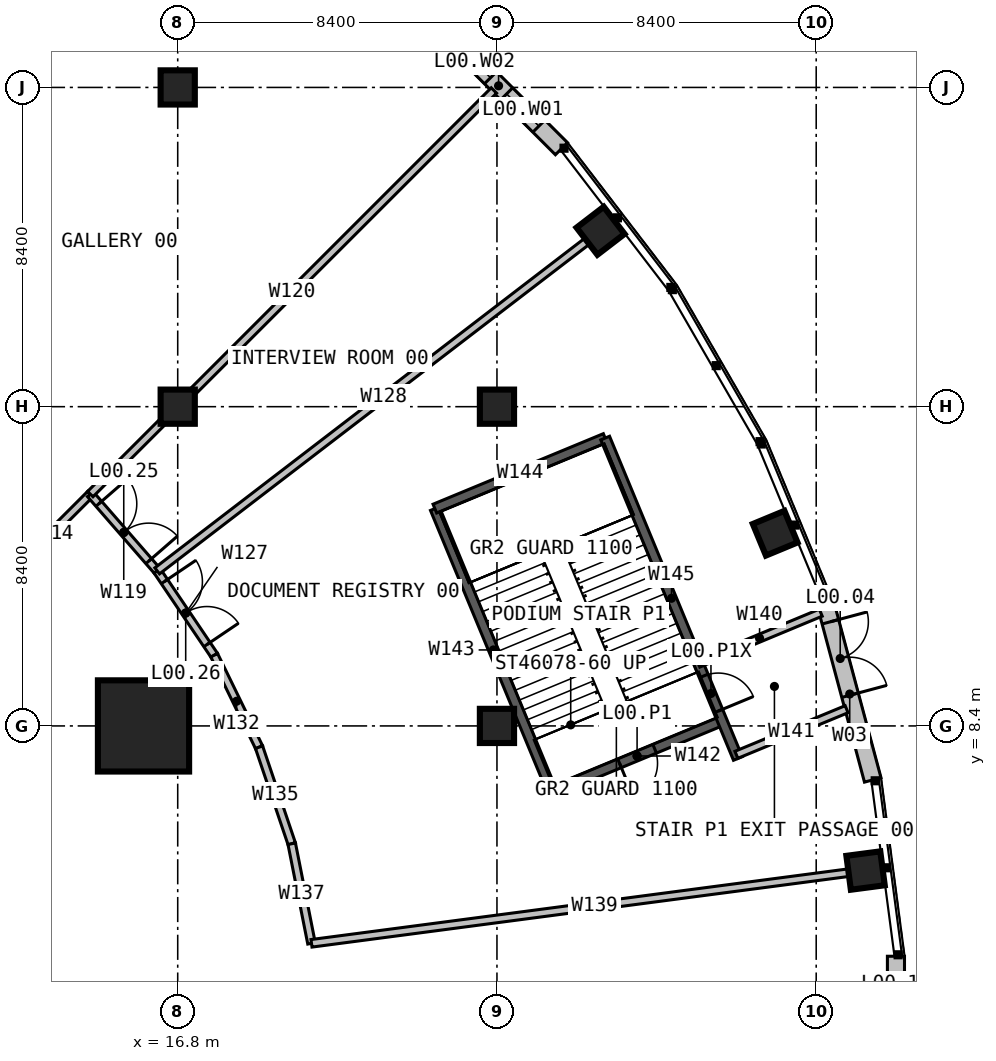
"""IFC4 building model, lengths in metres.
Left out: names, types, materials, properties, quantities, classifications, styles, units other than length and angle.
Written with IfcOpenShell. Run it as: python <this file> out.ifc"""

import sys

from ifc_helpers import new_model, si_unit, direction, frame, frame_2d, origin, origin_2d, place, context, subcontext, project, spatial, rectangle, extrude, element, fill, save


model = new_model("IFC4")
c1 = context("Model", 3, precision=1e-05, world=origin(), true_north=direction((0.0, 1.0)))
c2 = subcontext(c1, "Body", "Model", "MODEL_VIEW")
j1 = project(units=[si_unit("LENGTHUNIT", "METRE"), si_unit("PLANEANGLEUNIT", "RADIAN")], contexts=[c1])
p1 = place(None, origin())
s1 = spatial("IfcSite", under=j1, at=p1, CompositionType="ELEMENT")
p2 = place(p1, origin())
s2 = spatial("IfcBuilding", under=s1, at=p2, CompositionType="ELEMENT")
p3 = place(p2, origin())
s3 = spatial("IfcBuildingStorey", under=s2, at=p3, CompositionType="ELEMENT", Elevation=0.0)
p4 = place(p3, frame((15.9, 8.4, 0.0), z_axis=(0.0, 0.0, 1.0), x_axis=(1.0, 0.0, 0.0)))
e1 = element("IfcColumn", 1, at=p4, inside=s3, PredefinedType="COLUMN", context=c2, shape_type="SweptSolid", body=[
    extrude(rectangle(XDim=2.4, YDim=2.4, at=origin_2d()), origin(), (0.0, 0.0, 1.0), 6.0),
])
for number, where, z_axis, x_axis in (
    (2, (16.8, 16.8, 0.0), (0.0, 0.0, 1.0), (1.0, 0.0, 0.0)),
    (3, (16.8, 25.2, 0.0), (0.0, 0.0, 1.0), (1.0, 0.0, 0.0)),
    (4, (25.2, 8.4, 0.0), (0.0, 0.0, 1.0), (1.0, 0.0, 0.0)),
    (5, (25.2, 16.8, 0.0), (0.0, 0.0, 1.0), (1.0, 0.0, 0.0)),
    (6, (34.899, 4.594, 0.0), (0.0, 0.0, 1.0), (0.991, 0.131, 0.0)),
    (7, (32.521, 13.47, 0.0), (0.0, 0.0, 1.0), (0.924, 0.383, 0.0)),
    (8, (27.926, 21.428, 0.0), (0.0, 0.0, 1.0), (0.793, 0.609, 0.0)),
):
    element("IfcColumn", number, at=place(p3, frame(where, z_axis=z_axis, x_axis=x_axis)), inside=s3, PredefinedType="COLUMN", context=c2, shape_type="SweptSolid", body=[
        extrude(rectangle(XDim=0.9, YDim=0.9, at=origin_2d()), origin(), (0.0, 0.0, 1.0), 6.0),
    ])
p5 = place(p3, frame((35.088, 6.979, 0.0), z_axis=(0.0, 0.0, 1.0), x_axis=(-0.258815185258, 0.965926860523, 0.0)))
e9 = element("IfcWall", 9, at=p5, inside=s3, PredefinedType="SOLIDWALL", context=c2, shape_type="SweptSolid", body=[
    extrude(rectangle(XDim=4.68, YDim=0.45, at=frame_2d((2.34, 0.0))), origin(), (0.0, 0.0, 1.0), 5.7),
])
p6 = place(p5, frame((2.308, 0.0, 0.0)))
e10 = element("IfcOpeningElement", 10, at=p6, cuts=e9, PredefinedType="OPENING", context=c2, shape_type="SweptSolid", body=[
    extrude(rectangle(XDim=2.0, YDim=3.0, at=frame_2d((1.0, 1.5))), frame((0.0, 0.235, 0.0), z_axis=(0.0, -1.0, 0.0), x_axis=(1.0, 0.0, 0.0)), (0.0, 0.0, 1.0), 0.47),
])
p7 = place(p3, frame((26.897, 23.588, 0.0), z_axis=(0.0, 0.0, 1.0), x_axis=(-0.707106781187, 0.707106781187, 0.0)))
e11 = element("IfcWall", 11, at=p7, inside=s3, PredefinedType="SOLIDWALL", context=c2, shape_type="SweptSolid", body=[
    extrude(rectangle(XDim=4.679, YDim=0.45, at=frame_2d((2.34, 0.0))), origin(), (0.0, 0.0, 1.0), 5.7),
])
p8 = place(p7, frame((0.84, 0.0, 0.9)))
e12 = element("IfcOpeningElement", 12, at=p8, cuts=e11, PredefinedType="OPENING", context=c2, shape_type="SweptSolid", body=[
    extrude(rectangle(XDim=1.2, YDim=3.6, at=frame_2d((0.6, 1.8))), frame((0.0, 0.235, 0.0), z_axis=(0.0, -1.0, 0.0), x_axis=(1.0, 0.0, 0.0)), (0.0, 0.0, 1.0), 0.47),
])
p9 = place(p7, frame((2.64, 0.0, 0.9)))
e13 = element("IfcOpeningElement", 13, at=p9, cuts=e11, PredefinedType="OPENING", context=c2, shape_type="SweptSolid", body=[
    extrude(rectangle(XDim=1.2, YDim=3.6, at=frame_2d((0.6, 1.8))), frame((0.0, 0.235, 0.0), z_axis=(0.0, -1.0, 0.0), x_axis=(1.0, 0.0, 0.0)), (0.0, 0.0, 1.0), 0.47),
])
p10 = place(p3, frame((35.698, -2.34, 0.0), z_axis=(0.0, 0.0, 1.0), x_axis=(0.0, 1.0, 0.0)))
e14 = element("IfcWall", 14, at=p10, inside=s3, PredefinedType="SOLIDWALL", context=c2, shape_type="SweptSolid", body=[
    extrude(rectangle(XDim=4.68, YDim=0.45, at=frame_2d((2.34, 0.0))), origin(), (0.0, 0.0, 1.0), 5.7),
])
p11 = place(p10, frame((1.34, 0.0, 0.0)))
e15 = element("IfcOpeningElement", 15, at=p11, cuts=e14, PredefinedType="OPENING", context=c2, shape_type="SweptSolid", body=[
    extrude(rectangle(XDim=2.0, YDim=3.0, at=frame_2d((1.0, 1.5))), frame((0.0, 0.235, 0.0), z_axis=(0.0, -1.0, 0.0), x_axis=(1.0, 0.0, 0.0)), (0.0, 0.0, 1.0), 0.47),
])
p12 = place(p3, frame((31.127, 8.537, 0.0), z_axis=(0.0, 0.0, 1.0), x_axis=(-0.923880627248, -0.382680789426, 0.0)))
e16 = element("IfcWall", 16, at=p12, inside=s3, PredefinedType="SOLIDWALL", context=c2, shape_type="SweptSolid", body=[
    extrude(rectangle(XDim=4.85, YDim=0.25, at=frame_2d((2.425, 0.0))), origin(), (0.0, 0.0, 1.0), 6.0),
])
p13 = place(p12, frame((1.925, 0.0, 0.0)))
e17 = element("IfcOpeningElement", 17, at=p13, cuts=e16, PredefinedType="OPENING", context=c2, shape_type="SweptSolid", body=[
    extrude(rectangle(XDim=1.0, YDim=2.2, at=frame_2d((0.5, 1.1))), frame((0.0, 0.135, 0.0), z_axis=(0.0, -1.0, 0.0), x_axis=(1.0, 0.0, 0.0)), (0.0, 0.0, 1.0), 0.27),
])
p14 = place(p3, frame((26.647, 6.681, 0.0), z_axis=(0.0, 0.0, 1.0), x_axis=(-0.382689294869, 0.923877104161, 0.0)))
e18 = element("IfcWall", 18, at=p14, inside=s3, PredefinedType="SOLIDWALL", context=c2, shape_type="SweptSolid", body=[
    extrude(rectangle(XDim=8.05, YDim=0.25, at=frame_2d((4.025, 0.0))), origin(), (0.0, 0.0, 1.0), 6.0),
])
p15 = place(p3, frame((23.566, 14.118, 0.0), z_axis=(0.0, 0.0, 1.0), x_axis=(0.923862828997, 0.382723755727, 0.0)))
e19 = element("IfcWall", 19, at=p15, inside=s3, PredefinedType="SOLIDWALL", context=c2, shape_type="SweptSolid", body=[
    extrude(rectangle(XDim=4.85, YDim=0.25, at=frame_2d((2.425, 0.0))), origin(), (0.0, 0.0, 1.0), 6.0),
])
p16 = place(p3, frame((28.047, 15.974, 0.0), z_axis=(0.0, 0.0, 1.0), x_axis=(0.38267867035, -0.923881504988, 0.0)))
e20 = element("IfcWall", 20, at=p16, inside=s3, PredefinedType="SOLIDWALL", context=c2, shape_type="SweptSolid", body=[
    extrude(rectangle(XDim=9.125, YDim=0.25, at=frame_2d((4.562, 0.0))), origin(), (0.0, 0.0, 1.0), 6.0),
])
p17 = place(p16, frame((6.775, 0.0, 0.0)))
e21 = element("IfcOpeningElement", 21, at=p17, cuts=e20, PredefinedType="OPENING", context=c2, shape_type="SweptSolid", body=[
    extrude(rectangle(XDim=1.0, YDim=2.2, at=frame_2d((0.5, 1.1))), frame((0.0, 0.135, 0.0), z_axis=(0.0, -1.0, 0.0), x_axis=(1.0, 0.0, 0.0)), (0.0, 0.0, 1.0), 0.27),
])
p18 = place(p3, frame((12.38, 12.38, 0.0), z_axis=(0.0, 0.0, 1.0), x_axis=(0.707106781187, 0.707106781187, 0.0)))
e22 = element("IfcWall", 22, at=p18, inside=s3, PredefinedType="PARTITIONING", context=c2, shape_type="SweptSolid", body=[
    extrude(rectangle(XDim=2.998, YDim=0.2, at=frame_2d((1.499, 0.0))), origin(), (0.0, 0.0, 1.0), 5.7),
])
p19 = place(p3, frame((14.5, 14.5, 0.0), z_axis=(0.0, 0.0, 1.0), x_axis=(0.656916126811, -0.753963661151, 0.0)))
e23 = element("IfcWall", 23, at=p19, inside=s3, PredefinedType="PARTITIONING", context=c2, shape_type="SweptSolid", body=[
    extrude(rectangle(XDim=2.679, YDim=0.2, at=frame_2d((1.34, 0.0))), origin(), (0.0, 0.0, 1.0), 5.7),
])
p20 = place(p19, frame((0.34, 0.0, 0.0)))
e24 = element("IfcOpeningElement", 24, at=p20, cuts=e23, PredefinedType="OPENING", context=c2, shape_type="SweptSolid", body=[
    extrude(rectangle(XDim=2.0, YDim=2.4, at=frame_2d((1.0, 1.2))), frame((0.0, 0.11, 0.0), z_axis=(0.0, -1.0, 0.0), x_axis=(1.0, 0.0, 0.0)), (0.0, 0.0, 1.0), 0.22),
])
p21 = place(p3, frame((14.5, 14.5, 0.0), z_axis=(0.0, 0.0, 1.0), x_axis=(0.707106781187, 0.707106781187, 0.0)))
e25 = element("IfcWall", 25, at=p21, inside=s3, PredefinedType="PARTITIONING", context=c2, shape_type="SweptSolid", body=[
    extrude(rectangle(XDim=15.019, YDim=0.2, at=frame_2d((7.51, 0.0))), origin(), (0.0, 0.0, 1.0), 5.7),
])
p22 = place(p3, frame((16.26, 12.48, 0.0), z_axis=(0.0, 0.0, 1.0), x_axis=(0.559862483837, -0.828585541264, 0.0)))
e26 = element("IfcWall", 26, at=p22, inside=s3, PredefinedType="PARTITIONING", context=c2, shape_type="SweptSolid", body=[
    extrude(rectangle(XDim=2.679, YDim=0.2, at=frame_2d((1.34, 0.0))), origin(), (0.0, 0.0, 1.0), 5.7),
])
p23 = place(p22, frame((0.34, 0.0, 0.0)))
e27 = element("IfcOpeningElement", 27, at=p23, cuts=e26, PredefinedType="OPENING", context=c2, shape_type="SweptSolid", body=[
    extrude(rectangle(XDim=2.0, YDim=2.4, at=frame_2d((1.0, 1.2))), frame((0.0, 0.11, 0.0), z_axis=(0.0, -1.0, 0.0), x_axis=(1.0, 0.0, 0.0)), (0.0, 0.0, 1.0), 0.22),
])
p24 = place(p3, frame((16.26, 12.48, 0.0), z_axis=(0.0, 0.0, 1.0), x_axis=(0.79355717759, 0.608495690943, 0.0)))
e28 = element("IfcWall", 28, at=p24, inside=s3, PredefinedType="PARTITIONING", context=c2, shape_type="SweptSolid", body=[
    extrude(rectangle(XDim=15.021, YDim=0.2, at=frame_2d((7.51, 0.0))), origin(), (0.0, 0.0, 1.0), 5.7),
])
p25 = place(p3, frame((17.76, 10.26, 0.0), z_axis=(0.0, 0.0, 1.0), x_axis=(0.438268188545, -0.898844255091, 0.0)))
e29 = element("IfcWall", 29, at=p25, inside=s3, PredefinedType="PARTITIONING", context=c2, shape_type="SweptSolid", body=[
    extrude(rectangle(XDim=2.692, YDim=0.2, at=frame_2d((1.346, 0.0))), origin(), (0.0, 0.0, 1.0), 5.7),
])
p26 = place(p3, frame((18.94, 7.84, 0.0), z_axis=(0.0, 0.0, 1.0), x_axis=(0.320730632057, -0.947170450162, 0.0)))
e30 = element("IfcWall", 30, at=p26, inside=s3, PredefinedType="PARTITIONING", context=c2, shape_type="SweptSolid", body=[
    extrude(rectangle(XDim=2.682, YDim=0.2, at=frame_2d((1.341, 0.0))), origin(), (0.0, 0.0, 1.0), 5.7),
])
p27 = place(p3, frame((19.8, 5.3, 0.0), z_axis=(0.0, 0.0, 1.0), x_axis=(0.194674669879, -0.980867867201, 0.0)))
e31 = element("IfcWall", 31, at=p27, inside=s3, PredefinedType="PARTITIONING", context=c2, shape_type="SweptSolid", body=[
    extrude(rectangle(XDim=2.671, YDim=0.2, at=frame_2d((1.335, 0.0))), origin(), (0.0, 0.0, 1.0), 5.7),
])
p28 = place(p3, frame((20.32, 2.68, 0.0), z_axis=(0.0, 0.0, 1.0), x_axis=(0.991459050186, 0.130418372192, 0.0)))
e32 = element("IfcWall", 32, at=p28, inside=s3, PredefinedType="PARTITIONING", context=c2, shape_type="SweptSolid", body=[
    extrude(rectangle(XDim=15.028, YDim=0.2, at=frame_2d((7.514, 0.0))), origin(), (0.0, 0.0, 1.0), 5.7),
])
p29 = place(p3, frame((30.5, 10.04, 0.0), z_axis=(0.0, 0.0, 1.0), x_axis=(0.923261142816, 0.384172958661, 0.0)))
e33 = element("IfcWall", 33, at=p29, inside=s3, PredefinedType="PARTITIONING", context=c2, shape_type="SweptSolid", body=[
    extrude(rectangle(XDim=3.488, YDim=0.2, at=frame_2d((1.744, 0.0))), origin(), (0.0, 0.0, 1.0), 5.7),
])
p30 = place(p3, frame((31.5, 7.64, 0.0), z_axis=(0.0, 0.0, 1.0), x_axis=(0.923990294705, 0.382415919243, 0.0)))
e34 = element("IfcWall", 34, at=p30, inside=s3, PredefinedType="PARTITIONING", context=c2, shape_type="SweptSolid", body=[
    extrude(rectangle(XDim=3.138, YDim=0.2, at=frame_2d((1.569, 0.0))), origin(), (0.0, 0.0, 1.0), 5.7),
])
p31 = place(p6, frame((2.0, 0.0, 0.0), z_axis=(0.0, 0.0, 1.0), x_axis=(-1.0, 0.0, 0.0)))
e35 = element("IfcDoor", 35, at=p31, inside=s3, OperationType="DOUBLE_DOOR_SINGLE_SWING", PredefinedType="DOOR", context=c2, shape_type="SweptSolid", body=[
    extrude(rectangle(XDim=2.0, YDim=3.0, at=frame_2d((1.0, 1.5))), frame((0.0, 0.025, 0.0), z_axis=(0.0, -1.0, 0.0), x_axis=(1.0, 0.0, 0.0)), (0.0, 0.0, 1.0), 0.05),
])
fill(e10, e35)
p32 = place(p8, origin())
e36 = element("IfcWindow", 36, at=p32, inside=s3, PartitioningType="SINGLE_PANEL", PredefinedType="WINDOW", context=c2, shape_type="SweptSolid", body=[
    extrude(rectangle(XDim=1.2, YDim=3.6, at=frame_2d((0.6, 1.8))), frame((0.0, 0.03, 0.0), z_axis=(0.0, -1.0, 0.0), x_axis=(1.0, 0.0, 0.0)), (0.0, 0.0, 1.0), 0.06),
])
fill(e12, e36)
p33 = place(p9, origin())
e37 = element("IfcWindow", 37, at=p33, inside=s3, PartitioningType="SINGLE_PANEL", PredefinedType="WINDOW", context=c2, shape_type="SweptSolid", body=[
    extrude(rectangle(XDim=1.2, YDim=3.6, at=frame_2d((0.6, 1.8))), frame((0.0, 0.03, 0.0), z_axis=(0.0, -1.0, 0.0), x_axis=(1.0, 0.0, 0.0)), (0.0, 0.0, 1.0), 0.06),
])
fill(e13, e37)
p34 = place(p13, origin())
e38 = element("IfcDoor", 38, at=p34, inside=s3, OperationType="SINGLE_SWING_RIGHT", PredefinedType="DOOR", context=c2, shape_type="SweptSolid", body=[
    extrude(rectangle(XDim=1.0, YDim=2.2, at=frame_2d((0.5, 1.1))), frame((0.0, 0.025, 0.0), z_axis=(0.0, -1.0, 0.0), x_axis=(1.0, 0.0, 0.0)), (0.0, 0.0, 1.0), 0.05),
])
fill(e17, e38)
p35 = place(p17, origin())
e39 = element("IfcDoor", 39, at=p35, inside=s3, OperationType="SINGLE_SWING_RIGHT", PredefinedType="DOOR", context=c2, shape_type="SweptSolid", body=[
    extrude(rectangle(XDim=1.0, YDim=2.2, at=frame_2d((0.5, 1.1))), frame((0.0, 0.025, 0.0), z_axis=(0.0, -1.0, 0.0), x_axis=(1.0, 0.0, 0.0)), (0.0, 0.0, 1.0), 0.05),
])
fill(e21, e39)
p36 = place(p20, origin())
e40 = element("IfcDoor", 40, at=p36, inside=s3, OperationType="DOUBLE_DOOR_SINGLE_SWING", PredefinedType="DOOR", context=c2, shape_type="SweptSolid", body=[
    extrude(rectangle(XDim=2.0, YDim=2.4, at=frame_2d((1.0, 1.2))), frame((0.0, 0.025, 0.0), z_axis=(0.0, -1.0, 0.0), x_axis=(1.0, 0.0, 0.0)), (0.0, 0.0, 1.0), 0.05),
])
fill(e24, e40)
p37 = place(p23, origin())
e41 = element("IfcDoor", 41, at=p37, inside=s3, OperationType="DOUBLE_DOOR_SINGLE_SWING", PredefinedType="DOOR", context=c2, shape_type="SweptSolid", body=[
    extrude(rectangle(XDim=2.0, YDim=2.4, at=frame_2d((1.0, 1.2))), frame((0.0, 0.025, 0.0), z_axis=(0.0, -1.0, 0.0), x_axis=(1.0, 0.0, 0.0)), (0.0, 0.0, 1.0), 0.05),
])
fill(e27, e41)
save(model, sys.argv[1])
